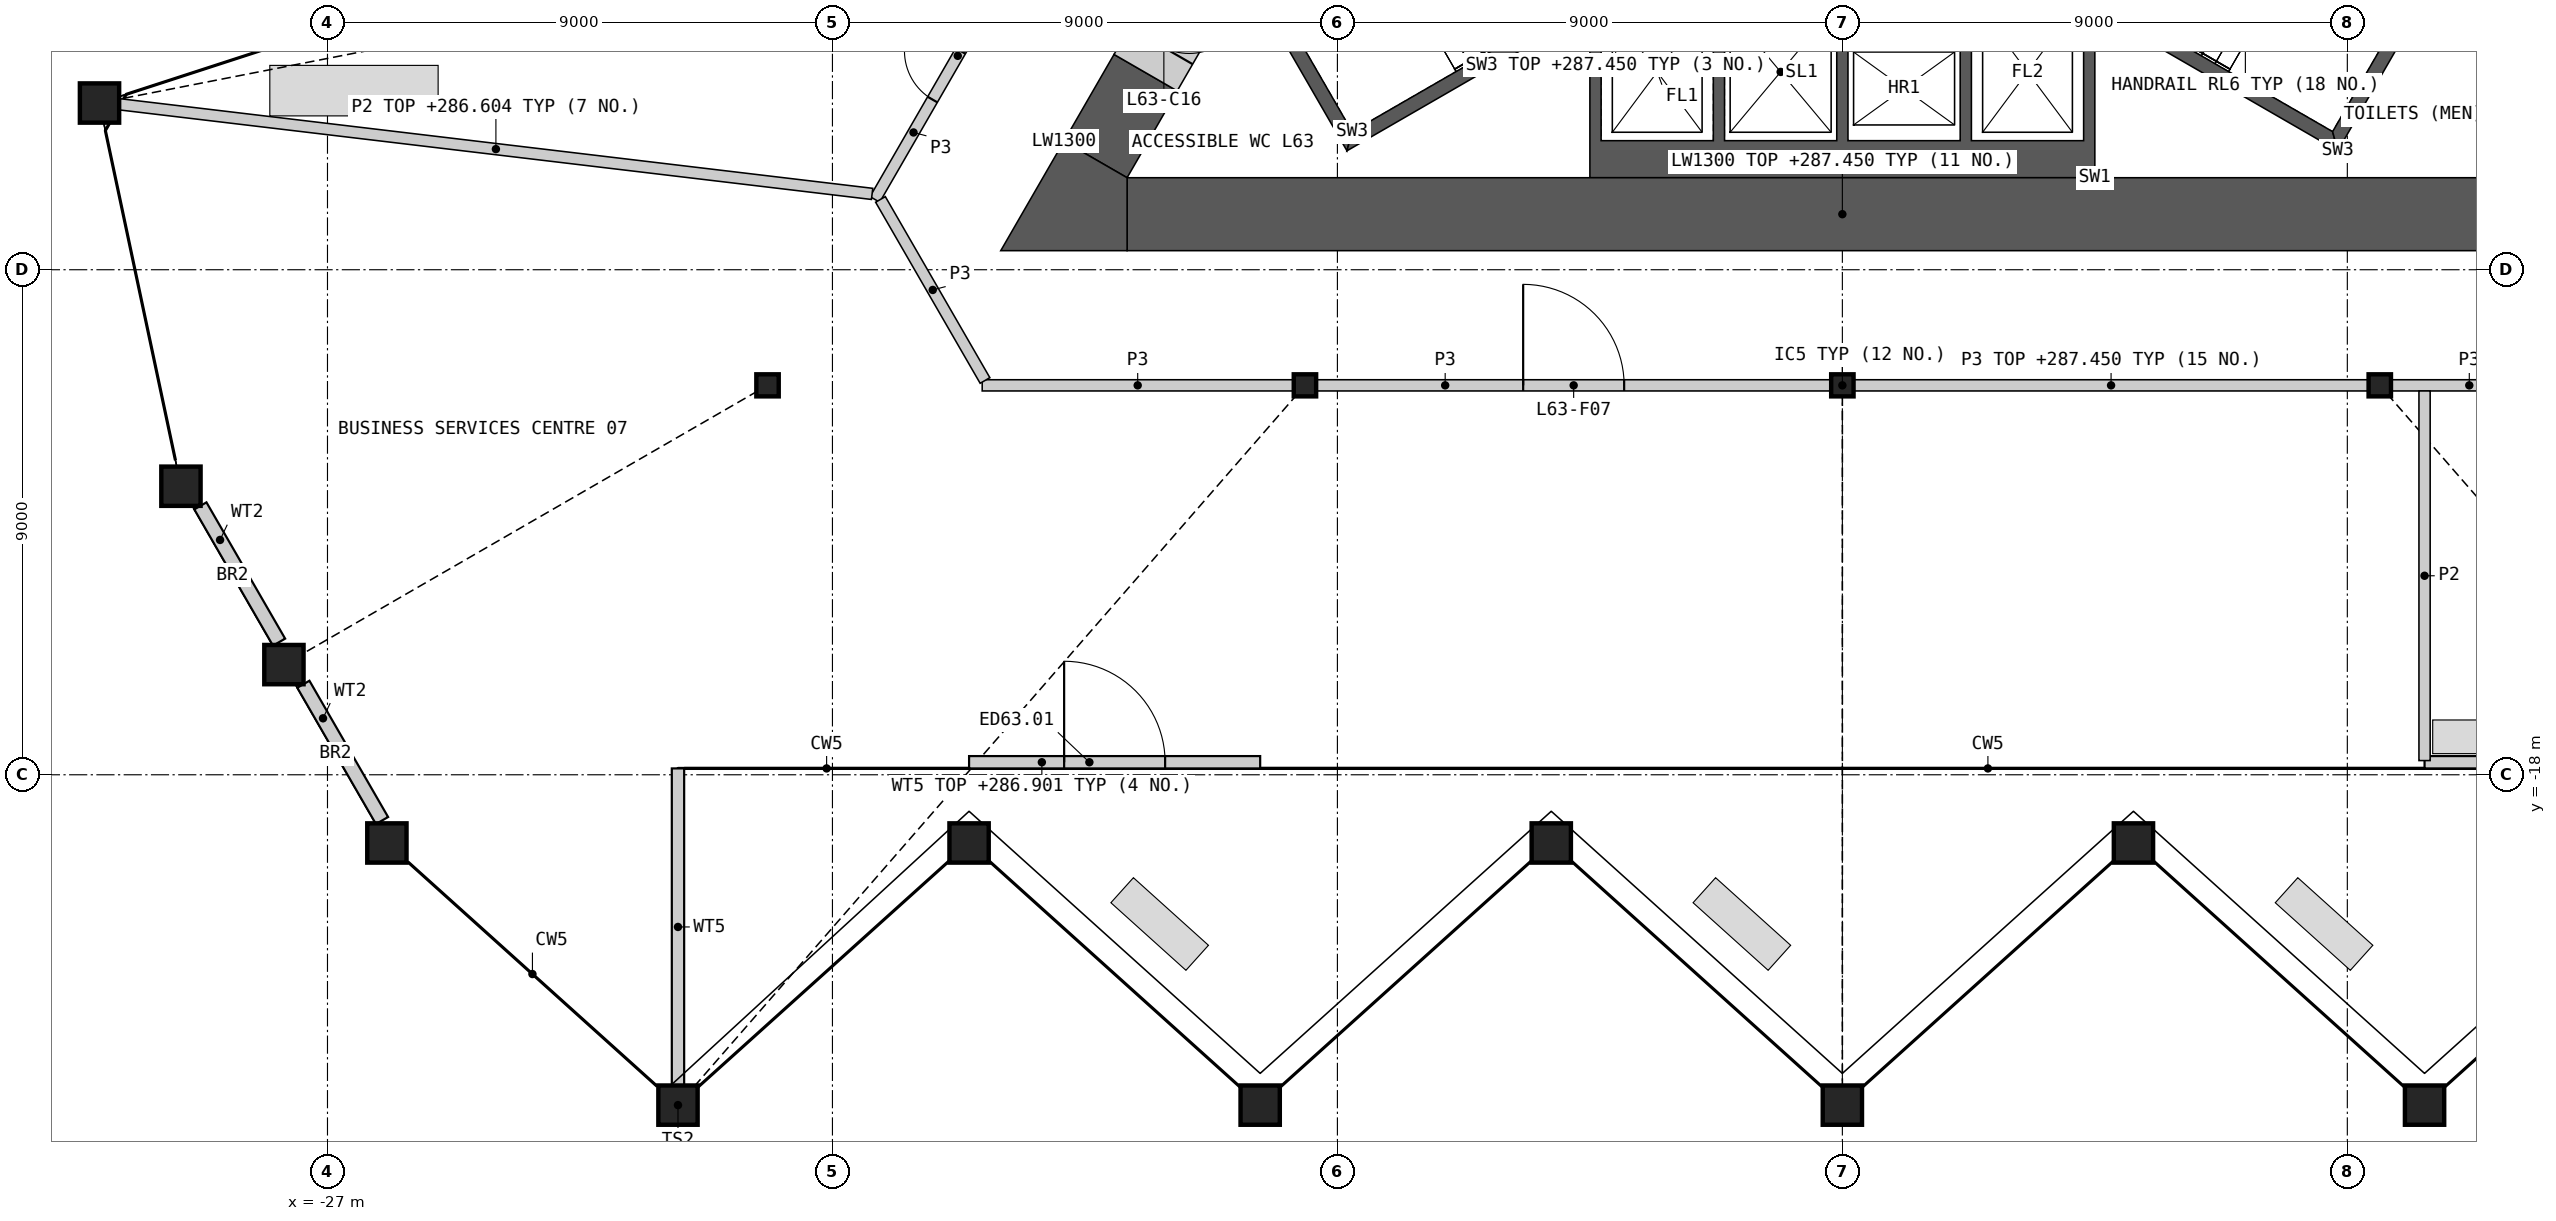
"""IFC4 building model, lengths in metres.
Left out: names, types, materials, properties, quantities, classifications, styles, units other than length and angle.
Written with IfcOpenShell. Run it as: python <this file> out.ifc"""

import sys

from ifc_helpers import new_model, si_unit, direction, frame, frame_2d, origin, origin_2d, place, context, subcontext, project, spatial, polyline, rectangle, hollow_rectangle, i_section, outline, extrude, element, fill, save


model = new_model("IFC4")
c1 = context("Model", 3, precision=1e-05, world=origin(), true_north=direction((0.0, 1.0)))
c2 = subcontext(c1, "Body", "Model", "MODEL_VIEW")
j1 = project(units=[si_unit("LENGTHUNIT", "METRE"), si_unit("PLANEANGLEUNIT", "RADIAN")], contexts=[c1])
p1 = place(None, origin())
s1 = spatial("IfcSite", under=j1, at=p1, CompositionType="ELEMENT")
p2 = place(p1, origin())
s2 = spatial("IfcBuilding", under=s1, at=p2, CompositionType="ELEMENT")
p3 = place(p2, frame((0.0, 0.0, 277.8)))
s3 = spatial("IfcBuildingStorey", under=s2, at=p3, CompositionType="ELEMENT", Elevation=277.8)
for number, where, z_axis, x_axis in (
    (1, (-25.941, -19.215, 0.0), (0.0, 0.0, 1.0), (1.0, 0.0, 0.0)),
    (2, (-20.753, -23.887, 0.0), (0.0, 0.0, 1.0), (1.0, 0.0, 0.0)),
    (3, (-15.565, -19.215, 0.0), (0.0, 0.0, 1.0), (1.0, 0.0, 0.0)),
    (4, (-10.376, -23.887, 0.0), (0.0, 0.0, 1.0), (1.0, 0.0, 0.0)),
    (5, (-5.188, -19.215, 0.0), (0.0, 0.0, 1.0), (1.0, 0.0, 0.0)),
    (6, (0.0, -23.887, 0.0), (0.0, 0.0, 1.0), (1.0, 0.0, 0.0)),
    (7, (5.188, -19.215, 0.0), (0.0, 0.0, 1.0), (1.0, 0.0, 0.0)),
    (8, (10.376, -23.887, 0.0), (0.0, 0.0, 1.0), (1.0, 0.0, 0.0)),
    (9, (-31.063, -6.029, 0.0), (0.0, 0.0, 1.0), (1.0, 0.0, 0.0)),
    (10, (-29.612, -12.858, 0.0), (0.0, 0.0, 1.0), (1.0, 0.0, 0.0)),
    (11, (-27.776, -16.037, 0.0), (0.0, 0.0, 1.0), (1.0, 0.0, 0.0)),
):
    element("IfcColumn", number, at=place(p3, frame(where, z_axis=z_axis, x_axis=x_axis)), inside=s3, PredefinedType="COLUMN", context=c2, shape_type="SweptSolid", body=[
        extrude(hollow_rectangle(XDim=0.7, YDim=0.7, WallThickness=0.045, at=origin_2d()), origin(), (0.0, 0.0, 1.0), 10.0),
    ])
for number, where, z_axis, x_axis in (
    (12, (-19.157, -11.06, 0.0), (0.0, 0.0, 1.0), (1.0, 0.0, 0.0)),
    (13, (-9.578, -11.06, 0.0), (0.0, 0.0, 1.0), (1.0, 0.0, 0.0)),
    (14, (0.0, -11.06, 0.0), (0.0, 0.0, 1.0), (1.0, 0.0, 0.0)),
    (15, (9.578, -11.06, 0.0), (0.0, 0.0, 1.0), (1.0, 0.0, 0.0)),
):
    element("IfcColumn", number, at=place(p3, frame(where, z_axis=z_axis, x_axis=x_axis)), inside=s3, PredefinedType="COLUMN", context=c2, shape_type="SweptSolid", body=[
        extrude(i_section(OverallWidth=0.399, OverallDepth=0.393, WebThickness=0.023, FlangeThickness=0.037, at=origin_2d()), origin(), (0.0, 0.0, 1.0), 10.0),
    ])
for number, where, z_axis, x_axis in (
    (16, (-29.265, -13.208, 0.0), (0.0, 0.0, 1.0), (0.5, -0.866, 0.0)),
    (17, (-27.43, -16.387, 0.0), (0.0, 0.0, 1.0), (0.5, -0.866, 0.0)),
):
    element("IfcWall", number, at=place(p3, frame(where, z_axis=z_axis, x_axis=x_axis)), inside=s3, PredefinedType="SOLIDWALL", context=c2, shape_type="SweptSolid", body=[
        extrude(rectangle(XDim=2.804, YDim=0.25, at=frame_2d((1.402, 0.0))), origin(), (0.0, 0.0, 1.0), 9.101),
    ])
p4 = place(p3, frame((-15.565, -17.777, 0.0), z_axis=(0.0, 0.0, 1.0), x_axis=(1.0, 0.0, 0.0)))
e18 = element("IfcWall", 18, at=p4, inside=s3, PredefinedType="SOLIDWALL", context=c2, shape_type="SweptSolid", body=[
    extrude(rectangle(XDim=5.188, YDim=0.22, at=frame_2d((2.594, 0.0))), origin(), (0.0, 0.0, 1.0), 9.101),
])
p5 = place(p4, frame((1.694, 0.0, 0.0)))
e19 = element("IfcOpeningElement", 19, at=p5, cuts=e18, PredefinedType="OPENING", context=c2, shape_type="SweptSolid", body=[
    extrude(rectangle(XDim=1.8, YDim=2.4, at=frame_2d((0.9, 1.2))), frame((0.0, 0.12, 0.0), z_axis=(0.0, -1.0, 0.0), x_axis=(1.0, 0.0, 0.0)), (0.0, 0.0, 1.0), 0.24),
])
p6 = place(p3, frame((10.376, -17.777, 0.0), z_axis=(0.0, 0.0, 1.0), x_axis=(1.0, 0.0, 0.0)))
e20 = element("IfcWall", 20, at=p6, inside=s3, PredefinedType="SOLIDWALL", context=c2, shape_type="SweptSolid", body=[
    extrude(rectangle(XDim=5.188, YDim=0.22, at=frame_2d((2.594, 0.0))), origin(), (0.0, 0.0, 1.0), 9.101),
])
p7 = place(p6, frame((1.694, 0.0, 0.0)))
e21 = element("IfcOpeningElement", 21, at=p7, cuts=e20, PredefinedType="OPENING", context=c2, shape_type="SweptSolid", body=[
    extrude(rectangle(XDim=1.8, YDim=2.4, at=frame_2d((0.9, 1.2))), frame((0.0, 0.12, 0.0), z_axis=(0.0, -1.0, 0.0), x_axis=(1.0, 0.0, 0.0)), (0.0, 0.0, 1.0), 0.24),
])
p8 = place(p3, frame((-20.753, -23.537, 0.0), z_axis=(0.0, 0.0, 1.0), x_axis=(0.0, 1.0, 0.0)))
e22 = element("IfcWall", 22, at=p8, inside=s3, PredefinedType="SOLIDWALL", context=c2, shape_type="SweptSolid", body=[
    extrude(rectangle(XDim=5.65, YDim=0.22, at=frame_2d((2.825, 0.0))), origin(), (0.0, 0.0, 1.0), 9.101),
])
p9 = place(p3, origin())
e23 = element("IfcWall", 23, at=p9, inside=s3, PredefinedType="SHEAR", context=c2, shape_type="SweptSolid", body=[
    extrude(outline(polyline([(4.5, -7.36), (-4.5, -7.36), (-4.5, -4.4), (-4.3, -4.4), (-4.3, -6.7), (-2.3, -6.7), (-2.3, -4.4), (-2.1, -4.4), (-2.1, -6.7), (-0.1, -6.7), (-0.1, -4.4), (0.1, -4.4), (0.1, -6.7), (2.1, -6.7), (2.1, -4.4), (2.3, -4.4), (2.3, -6.7), (4.3, -6.7), (4.3, -4.4), (4.5, -4.4), (4.5, -7.36)])), origin(), (0.0, 0.0, 1.0), 9.65),
])
p10 = place(p3, origin())
e24 = element("IfcWall", 24, at=p10, inside=s3, PredefinedType="SHEAR", context=c2, shape_type="SweptSolid", body=[
    extrude(outline(polyline([(-10.374, -4.206), (-8.83, -6.881), (-8.738, -6.539), (-10.032, -4.298), (-10.374, -4.206)])), origin(), (0.0, 0.0, 1.0), 9.65),
])
p11 = place(p3, origin())
e25 = element("IfcWall", 25, at=p11, inside=s3, PredefinedType="SHEAR", context=c2, shape_type="SweptSolid", body=[
    extrude(outline(polyline([(-8.738, -6.539), (-8.83, -6.881), (-3.763, -3.956), (-3.888, -3.739), (-8.738, -6.539)])), origin(), (0.0, 0.0, 1.0), 9.65),
])
p12 = place(p3, origin())
e26 = element("IfcWall", 26, at=p12, inside=s3, PredefinedType="SHEAR", context=c2, shape_type="SweptSolid", body=[
    extrude(outline(polyline([(3.763, -3.956), (8.83, -6.881), (8.738, -6.539), (3.888, -3.739), (3.763, -3.956)])), origin(), (0.0, 0.0, 1.0), 9.65),
])
p13 = place(p3, origin())
e27 = element("IfcWall", 27, at=p13, inside=s3, PredefinedType="SHEAR", context=c2, shape_type="SweptSolid", body=[
    extrude(outline(polyline([(8.83, -6.881), (10.374, -4.206), (10.032, -4.298), (8.738, -6.539), (8.83, -6.881)])), origin(), (0.0, 0.0, 1.0), 9.65),
])
p14 = place(p3, frame((-12.748, -8.01, 0.0), z_axis=(0.0, 0.0, 1.0), x_axis=(1.0, 0.0, 0.0)))
e28 = element("IfcWall", 28, at=p14, inside=s3, PredefinedType="SHEAR", context=c2, shape_type="SweptSolid", body=[
    extrude(rectangle(XDim=25.497, YDim=1.3, at=frame_2d((12.748, 0.0))), origin(), (0.0, 0.0, 1.0), 9.65),
])
p15 = place(p3, frame((13.311, -7.035, 0.0), z_axis=(0.0, 0.0, 1.0), x_axis=(-0.500003555838, 0.866023350811, 0.0)))
e29 = element("IfcWall", 29, at=p15, inside=s3, PredefinedType="SHEAR", context=c2, shape_type="SweptSolid", body=[
    extrude(rectangle(XDim=4.26, YDim=1.3, at=frame_2d((2.13, 0.0))), origin(), (0.0, 0.0, 1.0), 9.65),
])
p16 = place(p3, frame((-12.418, -5.488, 0.0), z_axis=(0.0, 0.0, 1.0), x_axis=(-0.499931460552, -0.866064971437, 0.0)))
e30 = element("IfcWall", 30, at=p16, inside=s3, PredefinedType="SHEAR", context=c2, shape_type="SweptSolid", body=[
    extrude(rectangle(XDim=1.786, YDim=1.3, at=frame_2d((0.893, 0.0))), origin(), (0.0, 0.0, 1.0), 9.65),
])
p17 = place(p3, origin())
e31 = element("IfcWall", 31, at=p17, inside=s3, PredefinedType="SHEAR", context=c2, shape_type="SweptSolid", body=[
    extrude(outline(polyline([(-13.874, -6.71), (-12.748, -7.36), (-12.748, -8.66), (-15.0, -8.66), (-13.874, -6.71)])), origin(), (0.0, 0.0, 1.0), 9.65),
])
p18 = place(p3, frame((-11.318, -3.583, 0.0), z_axis=(0.0, 0.0, 1.0), x_axis=(-0.50002983664, -0.866008176907, 0.0)))
e32 = element("IfcWall", 32, at=p18, inside=s3, PredefinedType="SHEAR", context=c2, shape_type="SweptSolid", body=[
    extrude(rectangle(XDim=2.2, YDim=1.3, at=frame_2d((1.1, 0.0))), origin(), (0.0, 0.0, 1.0), 9.65),
])
p19 = place(p18, frame((0.65, 0.0, 0.0)))
e33 = element("IfcOpeningElement", 33, at=p19, cuts=e32, PredefinedType="OPENING", context=c2, shape_type="SweptSolid", body=[
    extrude(rectangle(XDim=1.0, YDim=2.1, at=frame_2d((0.5, 1.05))), frame((0.0, 0.66, 0.0), z_axis=(0.0, -1.0, 0.0), x_axis=(1.0, 0.0, 0.0)), (0.0, 0.0, 1.0), 1.32),
])
p20 = place(p3, frame((0.209, -11.06, 0.0), z_axis=(0.0, 0.0, 1.0), x_axis=(1.0, 0.0, 0.0)))
e34 = element("IfcWall", 34, at=p20, inside=s3, PredefinedType="PARTITIONING", context=c2, shape_type="SweptSolid", body=[
    extrude(rectangle(XDim=9.159, YDim=0.2, at=frame_2d((4.58, 0.0))), origin(), (0.0, 0.0, 1.0), 9.65),
])
p21 = place(p3, frame((-9.369, -11.06, 0.0), z_axis=(0.0, 0.0, 1.0), x_axis=(1.0, 0.0, 0.0)))
e35 = element("IfcWall", 35, at=p21, inside=s3, PredefinedType="PARTITIONING", context=c2, shape_type="SweptSolid", body=[
    extrude(rectangle(XDim=9.159, YDim=0.2, at=frame_2d((4.58, 0.0))), origin(), (0.0, 0.0, 1.0), 9.65),
])
p22 = place(p21, frame((3.68, 0.0, 0.0)))
e36 = element("IfcOpeningElement", 36, at=p22, cuts=e35, PredefinedType="OPENING", context=c2, shape_type="SweptSolid", body=[
    extrude(rectangle(XDim=1.8, YDim=2.1, at=frame_2d((0.9, 1.05))), frame((0.0, 0.11, 0.0), z_axis=(0.0, -1.0, 0.0), x_axis=(1.0, 0.0, 0.0)), (0.0, 0.0, 1.0), 0.22),
])
p23 = place(p3, frame((-15.331, -11.06, 0.0), z_axis=(0.0, 0.0, 1.0), x_axis=(1.0, 0.0, 0.0)))
e37 = element("IfcWall", 37, at=p23, inside=s3, PredefinedType="PARTITIONING", context=c2, shape_type="SweptSolid", body=[
    extrude(rectangle(XDim=5.543, YDim=0.2, at=frame_2d((2.771, 0.0))), origin(), (0.0, 0.0, 1.0), 9.65),
])
p24 = place(p3, frame((9.788, -11.06, 0.0), z_axis=(0.0, 0.0, 1.0), x_axis=(1.0, 0.0, 0.0)))
e38 = element("IfcWall", 38, at=p24, inside=s3, PredefinedType="PARTITIONING", context=c2, shape_type="SweptSolid", body=[
    extrude(rectangle(XDim=5.543, YDim=0.2, at=frame_2d((2.771, 0.0))), origin(), (0.0, 0.0, 1.0), 9.65),
])
p25 = place(p24, frame((2.074, 0.0, 0.0)))
e39 = element("IfcOpeningElement", 39, at=p25, cuts=e38, PredefinedType="OPENING", context=c2, shape_type="SweptSolid", body=[
    extrude(rectangle(XDim=1.8, YDim=2.1, at=frame_2d((0.9, 1.05))), frame((0.0, 0.11, 0.0), z_axis=(0.0, -1.0, 0.0), x_axis=(1.0, 0.0, 0.0)), (0.0, 0.0, 1.0), 0.22),
])
p26 = place(p3, frame((-17.244, -7.747, 0.0), z_axis=(0.0, 0.0, 1.0), x_axis=(0.500017753321, 0.866015153657, 0.0)))
e40 = element("IfcWall", 40, at=p26, inside=s3, PredefinedType="PARTITIONING", context=c2, shape_type="SweptSolid", body=[
    extrude(rectangle(XDim=5.51, YDim=0.2, at=frame_2d((2.755, 0.0))), origin(), (0.0, 0.0, 1.0), 9.65),
])
p27 = place(p26, frame((2.055, 0.0, 0.0)))
e41 = element("IfcOpeningElement", 41, at=p27, cuts=e40, PredefinedType="OPENING", context=c2, shape_type="SweptSolid", body=[
    extrude(rectangle(XDim=1.0, YDim=2.1, at=frame_2d((0.5, 1.05))), frame((0.0, 0.11, 0.0), z_axis=(0.0, -1.0, 0.0), x_axis=(1.0, 0.0, 0.0)), (0.0, 0.0, 1.0), 0.22),
])
p28 = place(p3, frame((-17.144, -7.747, 0.0), z_axis=(0.0, 0.0, 1.0), x_axis=(0.499958791762, -0.866049194065, 0.0)))
e42 = element("IfcWall", 42, at=p28, inside=s3, PredefinedType="PARTITIONING", context=c2, shape_type="SweptSolid", body=[
    extrude(rectangle(XDim=3.726, YDim=0.2, at=frame_2d((1.863, 0.0))), origin(), (0.0, 0.0, 1.0), 9.65),
])
p29 = place(p3, frame((-30.703, -6.052, 0.0), z_axis=(0.0, 0.0, 1.0), x_axis=(0.992988122615, -0.118214163049, 0.0)))
e43 = element("IfcWall", 43, at=p29, inside=s3, PredefinedType="PARTITIONING", context=c2, shape_type="SweptSolid", body=[
    extrude(rectangle(XDim=13.505, YDim=0.2, at=frame_2d((6.752, 0.0))), origin(), (0.0, 0.0, 1.0), 8.804),
])
p30 = place(p3, frame((10.376, -17.747, 0.0), z_axis=(0.0, 0.0, 1.0), x_axis=(0.0, 1.0, 0.0)))
e44 = element("IfcWall", 44, at=p30, inside=s3, PredefinedType="PARTITIONING", context=c2, shape_type="SweptSolid", body=[
    extrude(rectangle(XDim=6.586, YDim=0.2, at=frame_2d((3.293, 0.0))), origin(), (0.0, 0.0, 1.0), 8.804),
])
p31 = place(p5, origin())
e45 = element("IfcDoor", 45, at=p31, inside=s3, OperationType="DOUBLE_DOOR_SINGLE_SWING", PredefinedType="DOOR", context=c2, shape_type="SweptSolid", body=[
    extrude(rectangle(XDim=1.8, YDim=2.4, at=frame_2d((0.9, 1.2))), frame((0.0, 0.025, 0.0), z_axis=(0.0, -1.0, 0.0), x_axis=(1.0, 0.0, 0.0)), (0.0, 0.0, 1.0), 0.05),
])
fill(e19, e45)
p32 = place(p19, origin())
e46 = element("IfcDoor", 46, at=p32, inside=s3, OperationType="SINGLE_SWING_LEFT", PredefinedType="DOOR", context=c2, shape_type="SweptSolid", body=[
    extrude(rectangle(XDim=1.0, YDim=2.1, at=frame_2d((0.5, 1.05))), frame((0.0, 0.405, 0.0), z_axis=(0.0, -1.0, 0.0), x_axis=(1.0, 0.0, 0.0)), (0.0, 0.0, 1.0), 0.05),
])
fill(e33, e46)
p33 = place(p27, origin())
e47 = element("IfcDoor", 47, at=p33, inside=s3, OperationType="SINGLE_SWING_RIGHT", PredefinedType="DOOR", context=c2, shape_type="SweptSolid", body=[
    extrude(rectangle(XDim=1.0, YDim=2.1, at=frame_2d((0.5, 1.05))), frame((0.0, 0.025, 0.0), z_axis=(0.0, -1.0, 0.0), x_axis=(1.0, 0.0, 0.0)), (0.0, 0.0, 1.0), 0.05),
])
fill(e41, e47)
p34 = place(p22, origin())
e48 = element("IfcDoor", 48, at=p34, inside=s3, OperationType="DOUBLE_DOOR_SINGLE_SWING", PredefinedType="DOOR", context=c2, shape_type="SweptSolid", body=[
    extrude(rectangle(XDim=1.8, YDim=2.1, at=frame_2d((0.9, 1.05))), frame((0.0, 0.025, 0.0), z_axis=(0.0, -1.0, 0.0), x_axis=(1.0, 0.0, 0.0)), (0.0, 0.0, 1.0), 0.05),
])
fill(e36, e48)
save(model, sys.argv[1])
